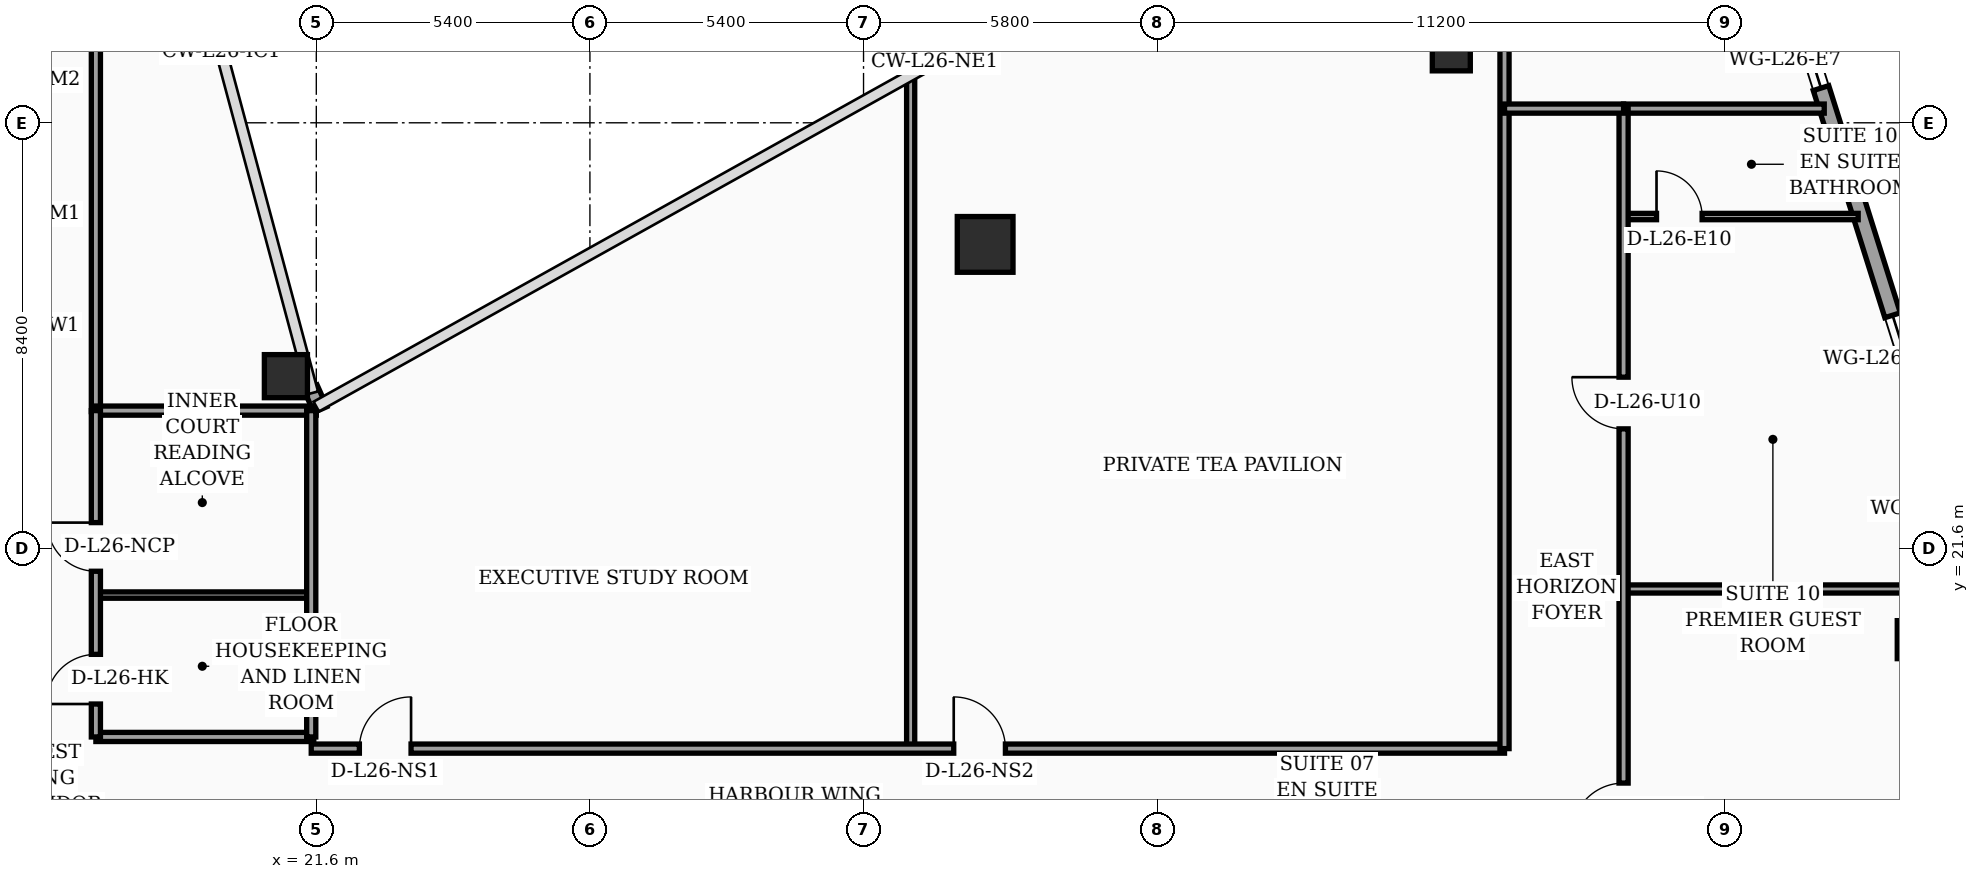
"""IFC4 building model, lengths in metres.
Left out: names, types, materials, properties, quantities, classifications, styles, units other than length and angle.
Written with IfcOpenShell. Run it as: python <this file> out.ifc"""

import sys

from ifc_helpers import new_model, si_unit, direction, frame, frame_2d, origin, origin_2d, place, context, subcontext, project, spatial, rectangle, hollow_rectangle, circle, extrude, element, fill, save


model = new_model("IFC4")
c1 = context("Model", 3, precision=1e-05, world=origin(), true_north=direction((0.0, 1.0)))
c2 = subcontext(c1, "Body", "Model", "MODEL_VIEW")
j1 = project(units=[si_unit("LENGTHUNIT", "METRE"), si_unit("PLANEANGLEUNIT", "RADIAN")], contexts=[c1])
p1 = place(None, origin())
s1 = spatial("IfcSite", under=j1, at=p1, CompositionType="ELEMENT")
p2 = place(p1, origin())
s2 = spatial("IfcBuilding", under=s1, at=p2, CompositionType="ELEMENT")
p3 = place(p2, frame((0.0, 0.0, 108.8)))
s3 = spatial("IfcBuildingStorey", under=s2, at=p3, CompositionType="ELEMENT", Elevation=108.8)
p4 = place(p3, frame((21.0, 25.0, 0.0), z_axis=(0.0, 0.0, 1.0), x_axis=(1.0, 0.0, 0.0)))
e1 = element("IfcColumn", 1, at=p4, inside=s3, PredefinedType="COLUMN", context=c2, shape_type="SweptSolid", body=[
    extrude(hollow_rectangle(XDim=0.85, YDim=0.85, WallThickness=0.036, at=origin_2d()), origin(), (0.0, 0.0, 1.0), 3.56),
])
p5 = place(p3, frame((34.8, 27.6, 0.0), z_axis=(0.0, 0.0, 1.0), x_axis=(1.0, 0.0, 0.0)))
e2 = element("IfcColumn", 2, at=p5, inside=s3, PredefinedType="COLUMN", context=c2, shape_type="SweptSolid", body=[
    extrude(circle(Radius=0.55, at=origin_2d()), origin(), (0.0, 0.0, 1.0), 3.56),
])
for number, where, z_axis, x_axis in (
    (3, (44.0, 31.4, 0.0), (0.0, 0.0, 1.0), (1.0, 0.0, 0.0)),
    (4, (53.176, 19.8, 0.0), (0.0, 0.0, 1.0), (1.0, 0.0, 0.0)),
):
    element("IfcColumn", number, at=place(p3, frame(where, z_axis=z_axis, x_axis=x_axis)), inside=s3, PredefinedType="COLUMN", context=c2, shape_type="SweptSolid", body=[
        extrude(hollow_rectangle(XDim=0.75, YDim=0.75, WallThickness=0.032, at=origin_2d()), origin(), (0.0, 0.0, 1.0), 3.56),
    ])
p6 = place(p3, frame((21.68, 24.34, 0.0), z_axis=(0.0, 0.0, 1.0), x_axis=(-0.40758134973, 0.913168901875, 0.0)))
e5 = element("IfcWall", 5, at=p6, inside=s3, PredefinedType="SOLIDWALL", context=c2, shape_type="SweptSolid", body=[
    extrude(rectangle(XDim=0.471, YDim=0.28, at=frame_2d((0.235, 0.0))), origin(), (0.0, 0.0, 1.0), 3.56),
])
p7 = place(p3, frame((59.23, 5.505, 0.0), z_axis=(0.0, 0.0, 1.0), x_axis=(-0.300509063924, 0.953778958931, 0.0)))
e6 = element("IfcWall", 6, at=p7, inside=s3, PredefinedType="SOLIDWALL", context=c2, shape_type="SweptSolid", body=[
    extrude(rectangle(XDim=30.814, YDim=0.32, at=frame_2d((15.407, 0.0))), origin(), (0.0, 0.0, 1.0), 3.56),
])
p8 = place(p7, frame((10.199, 0.0, 0.0)))
e7 = element("IfcOpeningElement", 7, at=p8, cuts=e6, PredefinedType="OPENING", context=c2, shape_type="SweptSolid", body=[
    extrude(rectangle(XDim=1.4, YDim=2.25, at=frame_2d((0.7, 1.125))), frame((0.0, 0.17, 0.0), z_axis=(0.0, -1.0, 0.0), x_axis=(1.0, 0.0, 0.0)), (0.0, 0.0, 1.0), 0.34),
])
p9 = place(p7, frame((2.65, 0.0, 0.75)))
e8 = element("IfcOpeningElement", 8, at=p9, cuts=e6, PredefinedType="OPENING", context=c2, shape_type="SweptSolid", body=[
    extrude(rectangle(XDim=1.5, YDim=1.6, at=frame_2d((0.75, 0.8))), frame((0.0, 0.17, 0.0), z_axis=(0.0, -1.0, 0.0), x_axis=(1.0, 0.0, 0.0)), (0.0, 0.0, 1.0), 0.34),
])
p10 = place(p7, frame((4.7, 0.0, 0.75)))
e9 = element("IfcOpeningElement", 9, at=p10, cuts=e6, PredefinedType="OPENING", context=c2, shape_type="SweptSolid", body=[
    extrude(rectangle(XDim=1.5, YDim=1.6, at=frame_2d((0.75, 0.8))), frame((0.0, 0.17, 0.0), z_axis=(0.0, -1.0, 0.0), x_axis=(1.0, 0.0, 0.0)), (0.0, 0.0, 1.0), 0.34),
])
p11 = place(p7, frame((7.8, 0.0, 0.75)))
e10 = element("IfcOpeningElement", 10, at=p11, cuts=e6, PredefinedType="OPENING", context=c2, shape_type="SweptSolid", body=[
    extrude(rectangle(XDim=1.5, YDim=1.6, at=frame_2d((0.75, 0.8))), frame((0.0, 0.17, 0.0), z_axis=(0.0, -1.0, 0.0), x_axis=(1.0, 0.0, 0.0)), (0.0, 0.0, 1.0), 0.34),
])
p12 = place(p7, frame((14.0, 0.0, 0.75)))
e11 = element("IfcOpeningElement", 11, at=p12, cuts=e6, PredefinedType="OPENING", context=c2, shape_type="SweptSolid", body=[
    extrude(rectangle(XDim=1.5, YDim=1.6, at=frame_2d((0.75, 0.8))), frame((0.0, 0.17, 0.0), z_axis=(0.0, -1.0, 0.0), x_axis=(1.0, 0.0, 0.0)), (0.0, 0.0, 1.0), 0.34),
])
p13 = place(p7, frame((17.1, 0.0, 0.75)))
e12 = element("IfcOpeningElement", 12, at=p13, cuts=e6, PredefinedType="OPENING", context=c2, shape_type="SweptSolid", body=[
    extrude(rectangle(XDim=1.5, YDim=1.6, at=frame_2d((0.75, 0.8))), frame((0.0, 0.17, 0.0), z_axis=(0.0, -1.0, 0.0), x_axis=(1.0, 0.0, 0.0)), (0.0, 0.0, 1.0), 0.34),
])
p14 = place(p7, frame((20.2, 0.0, 0.75)))
e13 = element("IfcOpeningElement", 13, at=p14, cuts=e6, PredefinedType="OPENING", context=c2, shape_type="SweptSolid", body=[
    extrude(rectangle(XDim=1.5, YDim=1.6, at=frame_2d((0.75, 0.8))), frame((0.0, 0.17, 0.0), z_axis=(0.0, -1.0, 0.0), x_axis=(1.0, 0.0, 0.0)), (0.0, 0.0, 1.0), 0.34),
])
p15 = place(p7, frame((26.4, 0.0, 0.75)))
e14 = element("IfcOpeningElement", 14, at=p15, cuts=e6, PredefinedType="OPENING", context=c2, shape_type="SweptSolid", body=[
    extrude(rectangle(XDim=1.5, YDim=1.6, at=frame_2d((0.75, 0.8))), frame((0.0, 0.17, 0.0), z_axis=(0.0, -1.0, 0.0), x_axis=(1.0, 0.0, 0.0)), (0.0, 0.0, 1.0), 0.34),
])
p16 = place(p3, frame((17.25, 24.3, 0.0), z_axis=(0.0, 0.0, 1.0), x_axis=(0.0, 1.0, 0.0)))
e15 = element("IfcWall", 15, at=p16, inside=s3, PredefinedType="PARTITIONING", context=c2, shape_type="SweptSolid", body=[
    extrude(rectangle(XDim=17.65, YDim=0.18, at=frame_2d((8.825, 0.0))), origin(), (0.0, 0.0, 1.0), 2.84),
])
p17 = place(p3, frame((17.25, 17.88, 0.0), z_axis=(0.0, 0.0, 1.0), x_axis=(1.0, 0.0, 0.0)))
e16 = element("IfcWall", 16, at=p17, inside=s3, PredefinedType="PARTITIONING", context=c2, shape_type="SweptSolid", body=[
    extrude(rectangle(XDim=4.3, YDim=0.18, at=frame_2d((2.15, 0.0))), origin(), (0.0, 0.0, 1.0), 3.56),
])
p18 = place(p3, frame((17.25, 20.68, 0.0), z_axis=(0.0, 0.0, 1.0), x_axis=(1.0, 0.0, 0.0)))
e17 = element("IfcWall", 17, at=p18, inside=s3, PredefinedType="PARTITIONING", context=c2, shape_type="SweptSolid", body=[
    extrude(rectangle(XDim=4.3, YDim=0.125, at=frame_2d((2.15, 0.0))), origin(), (0.0, 0.0, 1.0), 3.56),
])
p19 = place(p3, frame((17.25, 24.32, 0.0), z_axis=(0.0, 0.0, 1.0), x_axis=(1.0, 0.0, 0.0)))
e18 = element("IfcWall", 18, at=p19, inside=s3, PredefinedType="PARTITIONING", context=c2, shape_type="SweptSolid", body=[
    extrude(rectangle(XDim=4.35, YDim=0.18, at=frame_2d((2.175, 0.0))), origin(), (0.0, 0.0, 1.0), 3.56),
])
p20 = place(p3, frame((21.5, 17.88, 0.0), z_axis=(0.0, 0.0, 1.0), x_axis=(0.0, 1.0, 0.0)))
e19 = element("IfcWall", 19, at=p20, inside=s3, PredefinedType="PARTITIONING", context=c2, shape_type="SweptSolid", body=[
    extrude(rectangle(XDim=6.44, YDim=0.18, at=frame_2d((3.22, 0.0))), origin(), (0.0, 0.0, 1.0), 3.09),
])
p21 = place(p3, frame((17.25, 17.88, 0.0), z_axis=(0.0, 0.0, 1.0), x_axis=(0.0, 1.0, 0.0)))
e20 = element("IfcWall", 20, at=p21, inside=s3, PredefinedType="PARTITIONING", context=c2, shape_type="SweptSolid", body=[
    extrude(rectangle(XDim=6.44, YDim=0.18, at=frame_2d((3.22, 0.0))), origin(), (0.0, 0.0, 1.0), 3.09),
])
p22 = place(p21, frame((0.65, 0.0, 0.0)))
e21 = element("IfcOpeningElement", 21, at=p22, cuts=e20, PredefinedType="OPENING", context=c2, shape_type="SweptSolid", body=[
    extrude(rectangle(XDim=0.98, YDim=2.15, at=frame_2d((0.49, 1.075))), frame((0.0, 0.1, 0.0), z_axis=(0.0, -1.0, 0.0), x_axis=(1.0, 0.0, 0.0)), (0.0, 0.0, 1.0), 0.2),
])
p23 = place(p21, frame((3.27, 0.0, 0.0)))
e22 = element("IfcOpeningElement", 22, at=p23, cuts=e20, PredefinedType="OPENING", context=c2, shape_type="SweptSolid", body=[
    extrude(rectangle(XDim=0.96, YDim=2.2, at=frame_2d((0.48, 1.1))), frame((0.0, 0.1, 0.0), z_axis=(0.0, -1.0, 0.0), x_axis=(1.0, 0.0, 0.0)), (0.0, 0.0, 1.0), 0.2),
])
p24 = place(p3, frame((33.33, 17.65, 0.0), z_axis=(0.0, 0.0, 1.0), x_axis=(0.0, 1.0, 0.0)))
e23 = element("IfcWall", 23, at=p24, inside=s3, PredefinedType="PARTITIONING", context=c2, shape_type="SweptSolid", body=[
    extrude(rectangle(XDim=13.37, YDim=0.16, at=frame_2d((6.685, 0.0))), origin(), (0.0, 0.0, 1.0), 2.84),
])
p25 = place(p3, frame((21.5, 17.65, 0.0), z_axis=(0.0, 0.0, 1.0), x_axis=(1.0, 0.0, 0.0)))
e24 = element("IfcWall", 24, at=p25, inside=s3, PredefinedType="PARTITIONING", context=c2, shape_type="SweptSolid", body=[
    extrude(rectangle(XDim=23.55, YDim=0.18, at=frame_2d((11.775, 0.0))), origin(), (0.0, 0.0, 1.0), 2.84),
])
p26 = place(p25, frame((0.95, 0.0, 0.0)))
e25 = element("IfcOpeningElement", 25, at=p26, cuts=e24, PredefinedType="OPENING", context=c2, shape_type="SweptSolid", body=[
    extrude(rectangle(XDim=1.02, YDim=2.2, at=frame_2d((0.51, 1.1))), frame((0.0, 0.1, 0.0), z_axis=(0.0, -1.0, 0.0), x_axis=(1.0, 0.0, 0.0)), (0.0, 0.0, 1.0), 0.2),
])
p27 = place(p25, frame((12.68, 0.0, 0.0)))
e26 = element("IfcOpeningElement", 26, at=p27, cuts=e24, PredefinedType="OPENING", context=c2, shape_type="SweptSolid", body=[
    extrude(rectangle(XDim=1.02, YDim=2.2, at=frame_2d((0.51, 1.1))), frame((0.0, 0.1, 0.0), z_axis=(0.0, -1.0, 0.0), x_axis=(1.0, 0.0, 0.0)), (0.0, 0.0, 1.0), 0.2),
])
p28 = place(p3, frame((45.05, 17.65, 0.0), z_axis=(0.0, 0.0, 1.0), x_axis=(0.0, 1.0, 0.0)))
e27 = element("IfcWall", 27, at=p28, inside=s3, PredefinedType="PARTITIONING", context=c2, shape_type="SweptSolid", body=[
    extrude(rectangle(XDim=19.9, YDim=0.18, at=frame_2d((9.95, 0.0))), origin(), (0.0, 0.0, 1.0), 2.84),
])
p29 = place(p3, frame((47.4, 28.15, 0.0), z_axis=(0.0, 0.0, 1.0), x_axis=(1.0, 0.0, 0.0)))
e28 = element("IfcWall", 28, at=p29, inside=s3, PredefinedType="PARTITIONING", context=c2, shape_type="SweptSolid", body=[
    extrude(rectangle(XDim=4.63, YDim=0.125, at=frame_2d((2.315, 0.0))), origin(), (0.0, 0.0, 1.0), 3.04),
])
p30 = place(p29, frame((0.65, 0.0, 0.0)))
e29 = element("IfcOpeningElement", 29, at=p30, cuts=e28, PredefinedType="OPENING", context=c2, shape_type="SweptSolid", body=[
    extrude(rectangle(XDim=0.9, YDim=2.15, at=frame_2d((0.45, 1.075))), frame((0.0, 0.073, 0.0), z_axis=(0.0, -1.0, 0.0), x_axis=(1.0, 0.0, 0.0)), (0.0, 0.0, 1.0), 0.145),
])
p31 = place(p3, frame((47.4, 20.8, 0.0), z_axis=(0.0, 0.0, 1.0), x_axis=(1.0, 0.0, 0.0)))
e30 = element("IfcWall", 30, at=p31, inside=s3, PredefinedType="PARTITIONING", context=c2, shape_type="SweptSolid", body=[
    extrude(rectangle(XDim=6.95, YDim=0.16, at=frame_2d((3.475, 0.0))), origin(), (0.0, 0.0, 1.0), 3.04),
])
p32 = place(p3, frame((47.4, 30.28, 0.0), z_axis=(0.0, 0.0, 1.0), x_axis=(1.0, 0.0, 0.0)))
e31 = element("IfcWall", 31, at=p32, inside=s3, PredefinedType="PARTITIONING", context=c2, shape_type="SweptSolid", body=[
    extrude(rectangle(XDim=3.96, YDim=0.18, at=frame_2d((1.98, 0.0))), origin(), (0.0, 0.0, 1.0), 3.04),
])
p33 = place(p3, frame((47.4, 2.44, 0.0), z_axis=(0.0, 0.0, 1.0), x_axis=(0.0, 1.0, 0.0)))
e32 = element("IfcWall", 32, at=p33, inside=s3, PredefinedType="PARTITIONING", context=c2, shape_type="SweptSolid", body=[
    extrude(rectangle(XDim=27.84, YDim=0.18, at=frame_2d((13.92, 0.0))), origin(), (0.0, 0.0, 1.0), 2.84),
])
p34 = place(p33, frame((13.51, 0.0, 0.0)))
e33 = element("IfcOpeningElement", 33, at=p34, cuts=e32, PredefinedType="OPENING", context=c2, shape_type="SweptSolid", body=[
    extrude(rectangle(XDim=1.02, YDim=2.2, at=frame_2d((0.51, 1.1))), frame((0.0, 0.1, 0.0), z_axis=(0.0, -1.0, 0.0), x_axis=(1.0, 0.0, 0.0)), (0.0, 0.0, 1.0), 0.2),
])
p35 = place(p33, frame((21.52, 0.0, 0.0)))
e34 = element("IfcOpeningElement", 34, at=p35, cuts=e32, PredefinedType="OPENING", context=c2, shape_type="SweptSolid", body=[
    extrude(rectangle(XDim=1.02, YDim=2.2, at=frame_2d((0.51, 1.1))), frame((0.0, 0.1, 0.0), z_axis=(0.0, -1.0, 0.0), x_axis=(1.0, 0.0, 0.0)), (0.0, 0.0, 1.0), 0.2),
])
p36 = place(p3, frame((45.05, 30.28, 0.0), z_axis=(0.0, 0.0, 1.0), x_axis=(1.0, 0.0, 0.0)))
e35 = element("IfcWall", 35, at=p36, inside=s3, PredefinedType="PARTITIONING", context=c2, shape_type="SweptSolid", body=[
    extrude(rectangle(XDim=2.35, YDim=0.18, at=frame_2d((1.175, 0.0))), origin(), (0.0, 0.0, 1.0), 2.84),
])
p37 = place(p14, origin())
e36 = element("IfcWindow", 36, at=p37, inside=s3, PartitioningType="SINGLE_PANEL", PredefinedType="WINDOW", context=c2, shape_type="SweptSolid", body=[
    extrude(rectangle(XDim=1.5, YDim=1.6, at=frame_2d((0.75, 0.8))), frame((0.0, 0.03, 0.0), z_axis=(0.0, -1.0, 0.0), x_axis=(1.0, 0.0, 0.0)), (0.0, 0.0, 1.0), 0.06),
])
fill(e13, e36)
p38 = place(p15, origin())
e37 = element("IfcWindow", 37, at=p38, inside=s3, PartitioningType="SINGLE_PANEL", PredefinedType="WINDOW", context=c2, shape_type="SweptSolid", body=[
    extrude(rectangle(XDim=1.5, YDim=1.6, at=frame_2d((0.75, 0.8))), frame((0.0, 0.03, 0.0), z_axis=(0.0, -1.0, 0.0), x_axis=(1.0, 0.0, 0.0)), (0.0, 0.0, 1.0), 0.06),
])
fill(e14, e37)
p39 = place(p22, origin())
e38 = element("IfcDoor", 38, at=p39, inside=s3, OperationType="SINGLE_SWING_LEFT", PredefinedType="DOOR", context=c2, shape_type="SweptSolid", body=[
    extrude(rectangle(XDim=0.98, YDim=2.15, at=frame_2d((0.49, 1.075))), frame((0.0, 0.025, 0.0), z_axis=(0.0, -1.0, 0.0), x_axis=(1.0, 0.0, 0.0)), (0.0, 0.0, 1.0), 0.05),
])
fill(e21, e38)
p40 = place(p23, origin())
e39 = element("IfcDoor", 39, at=p40, inside=s3, OperationType="SINGLE_SWING_RIGHT", PredefinedType="DOOR", context=c2, shape_type="SweptSolid", body=[
    extrude(rectangle(XDim=0.96, YDim=2.2, at=frame_2d((0.48, 1.1))), frame((0.0, 0.025, 0.0), z_axis=(0.0, -1.0, 0.0), x_axis=(1.0, 0.0, 0.0)), (0.0, 0.0, 1.0), 0.05),
])
fill(e22, e39)
p41 = place(p26, origin())
e40 = element("IfcDoor", 40, at=p41, inside=s3, OperationType="SINGLE_SWING_RIGHT", PredefinedType="DOOR", context=c2, shape_type="SweptSolid", body=[
    extrude(rectangle(XDim=1.02, YDim=2.2, at=frame_2d((0.51, 1.1))), frame((0.0, 0.025, 0.0), z_axis=(0.0, -1.0, 0.0), x_axis=(1.0, 0.0, 0.0)), (0.0, 0.0, 1.0), 0.05),
])
fill(e25, e40)
p42 = place(p27, origin())
e41 = element("IfcDoor", 41, at=p42, inside=s3, OperationType="SINGLE_SWING_LEFT", PredefinedType="DOOR", context=c2, shape_type="SweptSolid", body=[
    extrude(rectangle(XDim=1.02, YDim=2.2, at=frame_2d((0.51, 1.1))), frame((0.0, 0.025, 0.0), z_axis=(0.0, -1.0, 0.0), x_axis=(1.0, 0.0, 0.0)), (0.0, 0.0, 1.0), 0.05),
])
fill(e26, e41)
p43 = place(p30, origin())
e42 = element("IfcDoor", 42, at=p43, inside=s3, OperationType="SINGLE_SWING_LEFT", PredefinedType="DOOR", context=c2, shape_type="SweptSolid", body=[
    extrude(rectangle(XDim=0.9, YDim=2.15, at=frame_2d((0.45, 1.075))), frame((0.0, 0.025, 0.0), z_axis=(0.0, -1.0, 0.0), x_axis=(1.0, 0.0, 0.0)), (0.0, 0.0, 1.0), 0.05),
])
fill(e29, e42)
p44 = place(p34, origin())
e43 = element("IfcDoor", 43, at=p44, inside=s3, OperationType="SINGLE_SWING_LEFT", PredefinedType="DOOR", context=c2, shape_type="SweptSolid", body=[
    extrude(rectangle(XDim=1.02, YDim=2.2, at=frame_2d((0.51, 1.1))), frame((0.0, 0.025, 0.0), z_axis=(0.0, -1.0, 0.0), x_axis=(1.0, 0.0, 0.0)), (0.0, 0.0, 1.0), 0.05),
])
fill(e33, e43)
p45 = place(p35, origin())
e44 = element("IfcDoor", 44, at=p45, inside=s3, OperationType="SINGLE_SWING_RIGHT", PredefinedType="DOOR", context=c2, shape_type="SweptSolid", body=[
    extrude(rectangle(XDim=1.02, YDim=2.2, at=frame_2d((0.51, 1.1))), frame((0.0, 0.025, 0.0), z_axis=(0.0, -1.0, 0.0), x_axis=(1.0, 0.0, 0.0)), (0.0, 0.0, 1.0), 0.05),
])
fill(e34, e44)
save(model, sys.argv[1])
